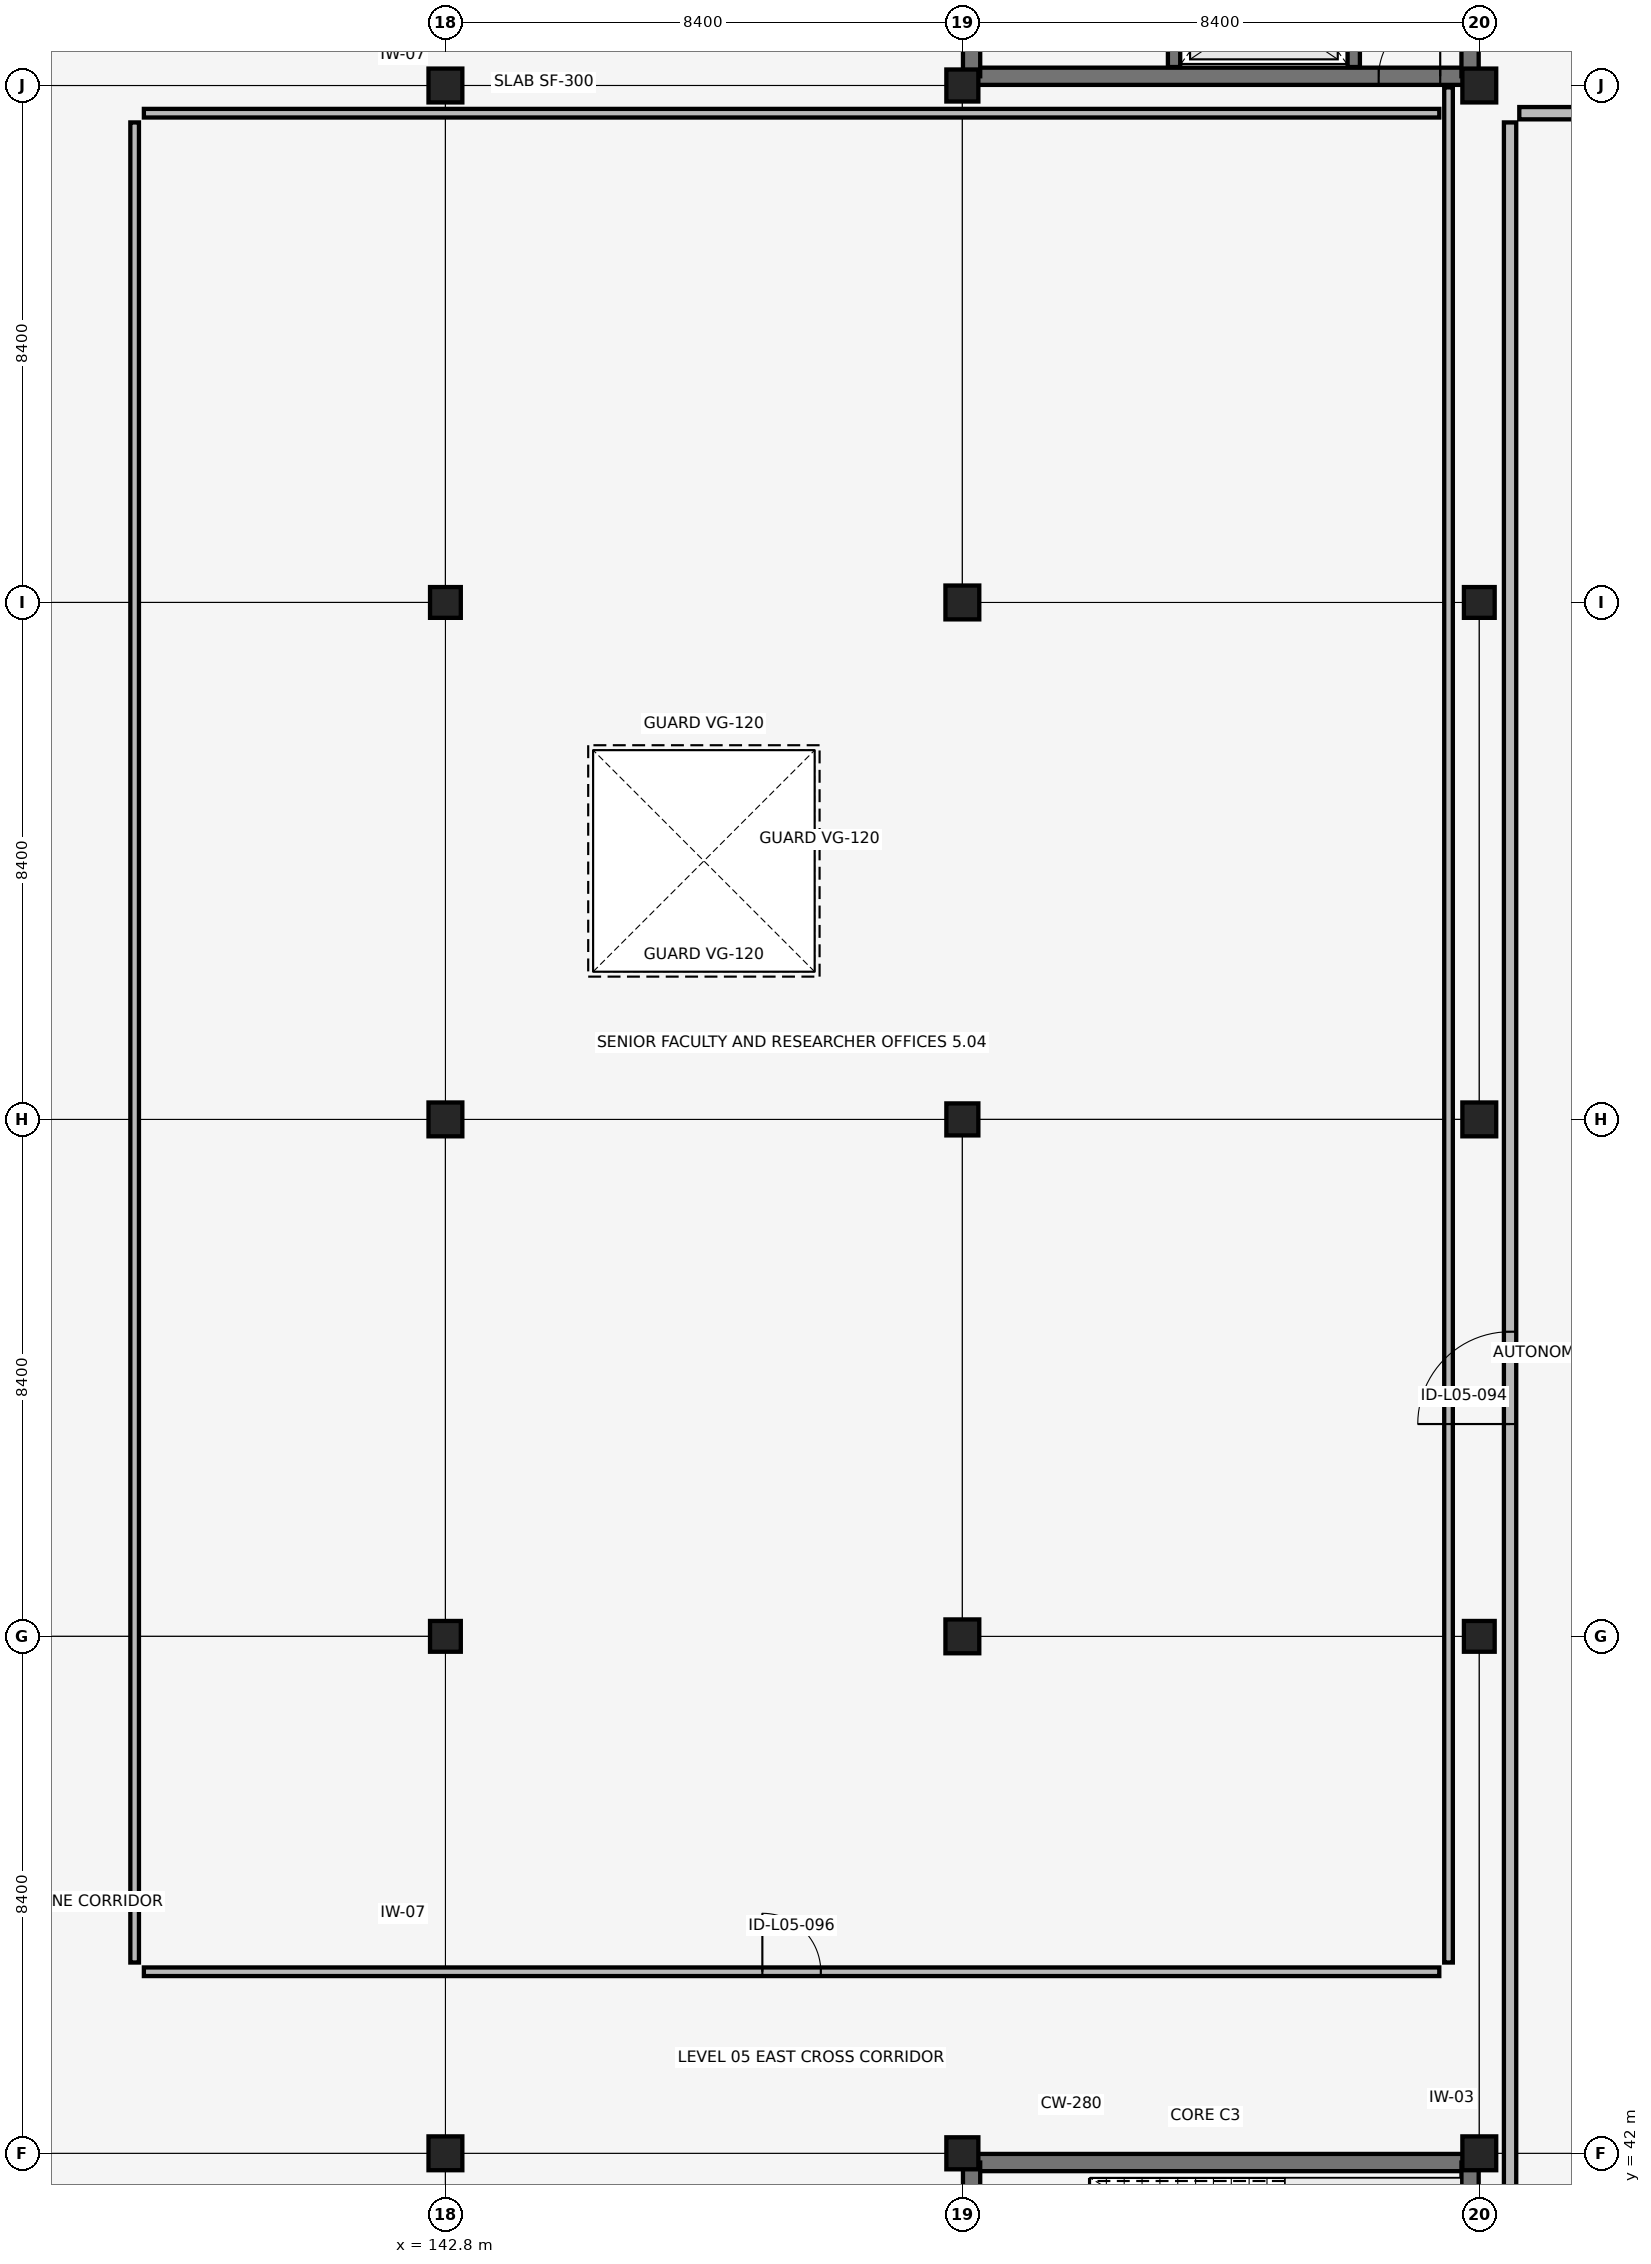
"""IFC4 building model, lengths in metres.
Left out: names, types, materials, properties, quantities, classifications, styles, units other than length and angle.
Written with IfcOpenShell. Run it as: python <this file> out.ifc"""

import sys

from ifc_helpers import new_model, si_unit, direction, frame, frame_2d, origin, origin_2d, place, context, subcontext, project, spatial, rectangle, extrude, element, fill, save


model = new_model("IFC4")
c1 = context("Model", 3, precision=1e-05, world=origin(), true_north=direction((0.0, 1.0)))
c2 = subcontext(c1, "Body", "Model", "MODEL_VIEW")
j1 = project(units=[si_unit("LENGTHUNIT", "METRE"), si_unit("PLANEANGLEUNIT", "RADIAN")], contexts=[c1])
p1 = place(None, origin())
s1 = spatial("IfcSite", under=j1, at=p1, CompositionType="ELEMENT")
p2 = place(p1, origin())
s2 = spatial("IfcBuilding", under=s1, at=p2, CompositionType="ELEMENT")
p3 = place(p2, frame((0.0, 0.0, 22.1)))
s3 = spatial("IfcBuildingStorey", under=s2, at=p3, CompositionType="ELEMENT", Elevation=22.1)
p4 = place(p3, frame((151.35, 41.85, 0.0), z_axis=(0.0, 0.0, 1.0), x_axis=(1.0, 0.0, 0.0)))
e1 = element("IfcWall", 1, at=p4, inside=s3, PredefinedType="SHEAR", context=c2, shape_type="SweptSolid", body=[
    extrude(rectangle(XDim=8.1, YDim=0.28, at=frame_2d((4.05, 0.0))), origin(), (0.0, 0.0, 1.0), 3.78),
])
p5 = place(p3, frame((151.35, 33.75, 0.0), z_axis=(0.0, 0.0, 1.0), x_axis=(0.0, 1.0, 0.0)))
e2 = element("IfcWall", 2, at=p5, inside=s3, PredefinedType="SHEAR", context=c2, shape_type="SweptSolid", body=[
    extrude(rectangle(XDim=8.1, YDim=0.28, at=frame_2d((4.05, 0.0))), origin(), (0.0, 0.0, 1.0), 3.78),
])
p6 = place(p5, frame((1.325, 0.0, 0.0)))
e3 = element("IfcOpeningElement", 3, at=p6, cuts=e2, PredefinedType="OPENING", context=c2, shape_type="SweptSolid", body=[
    extrude(rectangle(XDim=1.45, YDim=2.15, at=frame_2d((0.725, 1.075))), frame((0.0, 0.15, 0.0), z_axis=(0.0, -1.0, 0.0), x_axis=(1.0, 0.0, 0.0)), (0.0, 0.0, 1.0), 0.3),
])
p7 = place(p3, frame((159.45, 33.75, 0.0), z_axis=(0.0, 0.0, 1.0), x_axis=(0.0, 1.0, 0.0)))
e4 = element("IfcWall", 4, at=p7, inside=s3, PredefinedType="SHEAR", context=c2, shape_type="SweptSolid", body=[
    extrude(rectangle(XDim=8.1, YDim=0.28, at=frame_2d((4.05, 0.0))), origin(), (0.0, 0.0, 1.0), 3.78),
])
p8 = place(p3, frame((151.35, 75.75, 0.0), z_axis=(0.0, 0.0, 1.0), x_axis=(1.0, 0.0, 0.0)))
e5 = element("IfcWall", 5, at=p8, inside=s3, PredefinedType="SHEAR", context=c2, shape_type="SweptSolid", body=[
    extrude(rectangle(XDim=8.1, YDim=0.28, at=frame_2d((4.05, 0.0))), origin(), (0.0, 0.0, 1.0), 3.78),
])
p9 = place(p8, frame((6.615, 0.0, 0.0)))
e6 = element("IfcOpeningElement", 6, at=p9, cuts=e5, PredefinedType="OPENING", context=c2, shape_type="SweptSolid", body=[
    extrude(rectangle(XDim=1.0, YDim=2.15, at=frame_2d((0.5, 1.075))), frame((0.0, 0.15, 0.0), z_axis=(0.0, -1.0, 0.0), x_axis=(1.0, 0.0, 0.0)), (0.0, 0.0, 1.0), 0.3),
])
p10 = place(p3, frame((151.35, 75.75, 0.0), z_axis=(0.0, 0.0, 1.0), x_axis=(0.0, 1.0, 0.0)))
e7 = element("IfcWall", 7, at=p10, inside=s3, PredefinedType="SHEAR", context=c2, shape_type="SweptSolid", body=[
    extrude(rectangle(XDim=8.1, YDim=0.28, at=frame_2d((4.05, 0.0))), origin(), (0.0, 0.0, 1.0), 3.78),
])
p11 = place(p10, frame((1.325, 0.0, 0.0)))
e8 = element("IfcOpeningElement", 8, at=p11, cuts=e7, PredefinedType="OPENING", context=c2, shape_type="SweptSolid", body=[
    extrude(rectangle(XDim=1.45, YDim=2.15, at=frame_2d((0.725, 1.075))), frame((0.0, 0.15, 0.0), z_axis=(0.0, -1.0, 0.0), x_axis=(1.0, 0.0, 0.0)), (0.0, 0.0, 1.0), 0.3),
])
p12 = place(p3, frame((159.45, 75.75, 0.0), z_axis=(0.0, 0.0, 1.0), x_axis=(0.0, 1.0, 0.0)))
e9 = element("IfcWall", 9, at=p12, inside=s3, PredefinedType="SHEAR", context=c2, shape_type="SweptSolid", body=[
    extrude(rectangle(XDim=8.1, YDim=0.28, at=frame_2d((4.05, 0.0))), origin(), (0.0, 0.0, 1.0), 3.78),
])
p13 = place(p3, frame((142.8, 42.0, 0.0), z_axis=(0.0, 0.0, 1.0), x_axis=(1.0, 0.0, 0.0)))
e10 = element("IfcColumn", 10, at=p13, inside=s3, PredefinedType="COLUMN", context=c2, shape_type="SweptSolid", body=[
    extrude(rectangle(XDim=0.55, YDim=0.55, at=origin_2d()), origin(), (0.0, 0.0, 1.0), 3.78),
])
p14 = place(p3, frame((142.8, 50.4, 0.0), z_axis=(0.0, 0.0, 1.0), x_axis=(1.0, 0.0, 0.0)))
e11 = element("IfcColumn", 11, at=p14, inside=s3, PredefinedType="COLUMN", context=c2, shape_type="SweptSolid", body=[
    extrude(rectangle(XDim=0.5, YDim=0.5, at=origin_2d()), origin(), (0.0, 0.0, 1.0), 3.78),
])
p15 = place(p3, frame((142.8, 58.8, 0.0), z_axis=(0.0, 0.0, 1.0), x_axis=(1.0, 0.0, 0.0)))
e12 = element("IfcColumn", 12, at=p15, inside=s3, PredefinedType="COLUMN", context=c2, shape_type="SweptSolid", body=[
    extrude(rectangle(XDim=0.55, YDim=0.55, at=origin_2d()), origin(), (0.0, 0.0, 1.0), 3.78),
])
p16 = place(p3, frame((142.8, 67.2, 0.0), z_axis=(0.0, 0.0, 1.0), x_axis=(1.0, 0.0, 0.0)))
e13 = element("IfcColumn", 13, at=p16, inside=s3, PredefinedType="COLUMN", context=c2, shape_type="SweptSolid", body=[
    extrude(rectangle(XDim=0.5, YDim=0.5, at=origin_2d()), origin(), (0.0, 0.0, 1.0), 3.78),
])
p17 = place(p3, frame((142.8, 75.6, 0.0), z_axis=(0.0, 0.0, 1.0), x_axis=(1.0, 0.0, 0.0)))
e14 = element("IfcColumn", 14, at=p17, inside=s3, PredefinedType="COLUMN", context=c2, shape_type="SweptSolid", body=[
    extrude(rectangle(XDim=0.55, YDim=0.55, at=origin_2d()), origin(), (0.0, 0.0, 1.0), 3.78),
])
p18 = place(p3, frame((151.2, 42.0, 0.0), z_axis=(0.0, 0.0, 1.0), x_axis=(1.0, 0.0, 0.0)))
e15 = element("IfcColumn", 15, at=p18, inside=s3, PredefinedType="COLUMN", context=c2, shape_type="SweptSolid", body=[
    extrude(rectangle(XDim=0.52, YDim=0.52, at=origin_2d()), origin(), (0.0, 0.0, 1.0), 3.78),
])
p19 = place(p3, frame((151.2, 50.4, 0.0), z_axis=(0.0, 0.0, 1.0), x_axis=(1.0, 0.0, 0.0)))
e16 = element("IfcColumn", 16, at=p19, inside=s3, PredefinedType="COLUMN", context=c2, shape_type="SweptSolid", body=[
    extrude(rectangle(XDim=0.55, YDim=0.55, at=origin_2d()), origin(), (0.0, 0.0, 1.0), 3.78),
])
p20 = place(p3, frame((151.2, 58.8, 0.0), z_axis=(0.0, 0.0, 1.0), x_axis=(1.0, 0.0, 0.0)))
e17 = element("IfcColumn", 17, at=p20, inside=s3, PredefinedType="COLUMN", context=c2, shape_type="SweptSolid", body=[
    extrude(rectangle(XDim=0.52, YDim=0.52, at=origin_2d()), origin(), (0.0, 0.0, 1.0), 3.78),
])
p21 = place(p3, frame((151.2, 67.2, 0.0), z_axis=(0.0, 0.0, 1.0), x_axis=(1.0, 0.0, 0.0)))
e18 = element("IfcColumn", 18, at=p21, inside=s3, PredefinedType="COLUMN", context=c2, shape_type="SweptSolid", body=[
    extrude(rectangle(XDim=0.55, YDim=0.55, at=origin_2d()), origin(), (0.0, 0.0, 1.0), 3.78),
])
p22 = place(p3, frame((151.2, 75.6, 0.0), z_axis=(0.0, 0.0, 1.0), x_axis=(1.0, 0.0, 0.0)))
e19 = element("IfcColumn", 19, at=p22, inside=s3, PredefinedType="COLUMN", context=c2, shape_type="SweptSolid", body=[
    extrude(rectangle(XDim=0.52, YDim=0.52, at=origin_2d()), origin(), (0.0, 0.0, 1.0), 3.78),
])
p23 = place(p3, frame((159.6, 42.0, 0.0), z_axis=(0.0, 0.0, 1.0), x_axis=(1.0, 0.0, 0.0)))
e20 = element("IfcColumn", 20, at=p23, inside=s3, PredefinedType="COLUMN", context=c2, shape_type="SweptSolid", body=[
    extrude(rectangle(XDim=0.55, YDim=0.55, at=origin_2d()), origin(), (0.0, 0.0, 1.0), 3.78),
])
p24 = place(p3, frame((159.6, 50.4, 0.0), z_axis=(0.0, 0.0, 1.0), x_axis=(1.0, 0.0, 0.0)))
e21 = element("IfcColumn", 21, at=p24, inside=s3, PredefinedType="COLUMN", context=c2, shape_type="SweptSolid", body=[
    extrude(rectangle(XDim=0.5, YDim=0.5, at=origin_2d()), origin(), (0.0, 0.0, 1.0), 3.78),
])
p25 = place(p3, frame((159.6, 58.8, 0.0), z_axis=(0.0, 0.0, 1.0), x_axis=(1.0, 0.0, 0.0)))
e22 = element("IfcColumn", 22, at=p25, inside=s3, PredefinedType="COLUMN", context=c2, shape_type="SweptSolid", body=[
    extrude(rectangle(XDim=0.55, YDim=0.55, at=origin_2d()), origin(), (0.0, 0.0, 1.0), 3.78),
])
p26 = place(p3, frame((159.6, 67.2, 0.0), z_axis=(0.0, 0.0, 1.0), x_axis=(1.0, 0.0, 0.0)))
e23 = element("IfcColumn", 23, at=p26, inside=s3, PredefinedType="COLUMN", context=c2, shape_type="SweptSolid", body=[
    extrude(rectangle(XDim=0.5, YDim=0.5, at=origin_2d()), origin(), (0.0, 0.0, 1.0), 3.78),
])
p27 = place(p3, frame((159.6, 75.6, 0.0), z_axis=(0.0, 0.0, 1.0), x_axis=(1.0, 0.0, 0.0)))
e24 = element("IfcColumn", 24, at=p27, inside=s3, PredefinedType="COLUMN", context=c2, shape_type="SweptSolid", body=[
    extrude(rectangle(XDim=0.55, YDim=0.55, at=origin_2d()), origin(), (0.0, 0.0, 1.0), 3.78),
])
p28 = place(p3, frame((154.64, 75.9, 0.0), z_axis=(0.0, 0.0, 1.0), x_axis=(0.0, 1.0, 0.0)))
e25 = element("IfcWall", 25, at=p28, inside=s3, PredefinedType="SHEAR", context=c2, shape_type="SweptSolid", body=[
    extrude(rectangle(XDim=3.8, YDim=0.2, at=frame_2d((1.9, 0.0))), origin(), (0.0, 0.0, 1.0), 3.78),
])
p29 = place(p28, frame((0.375, 0.0, 0.0)))
e26 = element("IfcOpeningElement", 26, at=p29, cuts=e25, PredefinedType="OPENING", context=c2, shape_type="SweptSolid", body=[
    extrude(rectangle(XDim=1.1, YDim=2.15, at=frame_2d((0.55, 1.075))), frame((0.0, 0.11, 0.0), z_axis=(0.0, -1.0, 0.0), x_axis=(1.0, 0.0, 0.0)), (0.0, 0.0, 1.0), 0.22),
])
p30 = place(p28, frame((2.325, 0.0, 0.0)))
e27 = element("IfcOpeningElement", 27, at=p30, cuts=e25, PredefinedType="OPENING", context=c2, shape_type="SweptSolid", body=[
    extrude(rectangle(XDim=1.1, YDim=2.15, at=frame_2d((0.55, 1.075))), frame((0.0, 0.11, 0.0), z_axis=(0.0, -1.0, 0.0), x_axis=(1.0, 0.0, 0.0)), (0.0, 0.0, 1.0), 0.22),
])
p31 = place(p3, frame((157.56, 75.9, 0.0), z_axis=(0.0, 0.0, 1.0), x_axis=(0.0, 1.0, 0.0)))
e28 = element("IfcWall", 28, at=p31, inside=s3, PredefinedType="SHEAR", context=c2, shape_type="SweptSolid", body=[
    extrude(rectangle(XDim=3.8, YDim=0.2, at=frame_2d((1.9, 0.0))), origin(), (0.0, 0.0, 1.0), 3.78),
])
p32 = place(p3, frame((160.1, 34.2, 0.0), z_axis=(0.0, 0.0, 1.0), x_axis=(0.0, 1.0, 0.0)))
e29 = element("IfcWall", 29, at=p32, inside=s3, PredefinedType="PARTITIONING", context=c2, shape_type="SweptSolid", body=[
    extrude(rectangle(XDim=40.8, YDim=0.2, at=frame_2d((20.4, 0.0))), origin(), (0.0, 0.0, 1.0), 3.78),
])
p33 = place(p32, frame((19.65, 0.0, 0.0)))
e30 = element("IfcOpeningElement", 30, at=p33, cuts=e29, PredefinedType="OPENING", context=c2, shape_type="SweptSolid", body=[
    extrude(rectangle(XDim=1.5, YDim=2.2, at=frame_2d((0.75, 1.1))), frame((0.0, 0.11, 0.0), z_axis=(0.0, -1.0, 0.0), x_axis=(1.0, 0.0, 0.0)), (0.0, 0.0, 1.0), 0.22),
])
p34 = place(p3, frame((160.25, 75.15, 0.0), z_axis=(0.0, 0.0, 1.0), x_axis=(1.0, 0.0, 0.0)))
e31 = element("IfcWall", 31, at=p34, inside=s3, PredefinedType="PARTITIONING", context=c2, shape_type="SweptSolid", body=[
    extrude(rectangle(XDim=7.57, YDim=0.2, at=frame_2d((3.785, 0.0))), origin(), (0.0, 0.0, 1.0), 3.78),
])
p35 = place(p3, frame((137.9, 44.95, 0.0), z_axis=(0.0, 0.0, 1.0), x_axis=(1.0, 0.0, 0.0)))
e32 = element("IfcWall", 32, at=p35, inside=s3, PredefinedType="PARTITIONING", context=c2, shape_type="SweptSolid", body=[
    extrude(rectangle(XDim=21.05, YDim=0.14, at=frame_2d((10.525, 0.0))), origin(), (0.0, 0.0, 1.0), 3.13),
])
p36 = place(p35, frame((10.05, 0.0, 0.0)))
e33 = element("IfcOpeningElement", 33, at=p36, cuts=e32, PredefinedType="OPENING", context=c2, shape_type="SweptSolid", body=[
    extrude(rectangle(XDim=0.95, YDim=2.1, at=frame_2d((0.475, 1.05))), frame((0.0, 0.08, 0.0), z_axis=(0.0, -1.0, 0.0), x_axis=(1.0, 0.0, 0.0)), (0.0, 0.0, 1.0), 0.16),
])
p37 = place(p3, frame((137.9, 75.15, 0.0), z_axis=(0.0, 0.0, 1.0), x_axis=(1.0, 0.0, 0.0)))
e34 = element("IfcWall", 34, at=p37, inside=s3, PredefinedType="PARTITIONING", context=c2, shape_type="SweptSolid", body=[
    extrude(rectangle(XDim=21.05, YDim=0.14, at=frame_2d((10.525, 0.0))), origin(), (0.0, 0.0, 1.0), 3.13),
])
p38 = place(p3, frame((137.75, 45.1, 0.0), z_axis=(0.0, 0.0, 1.0), x_axis=(0.0, 1.0, 0.0)))
e35 = element("IfcWall", 35, at=p38, inside=s3, PredefinedType="PARTITIONING", context=c2, shape_type="SweptSolid", body=[
    extrude(rectangle(XDim=29.9, YDim=0.14, at=frame_2d((14.95, 0.0))), origin(), (0.0, 0.0, 1.0), 3.08),
])
p39 = place(p3, frame((159.1, 45.1, 0.0), z_axis=(0.0, 0.0, 1.0), x_axis=(0.0, 1.0, 0.0)))
e36 = element("IfcWall", 36, at=p39, inside=s3, PredefinedType="PARTITIONING", context=c2, shape_type="SweptSolid", body=[
    extrude(rectangle(XDim=30.47, YDim=0.14, at=frame_2d((15.235, 0.0))), origin(), (0.0, 0.0, 1.0), 3.08),
])
p40 = place(p9, origin())
e37 = element("IfcDoor", 37, at=p40, inside=s3, OperationType="SINGLE_SWING_RIGHT", PredefinedType="DOOR", context=c2, shape_type="SweptSolid", body=[
    extrude(rectangle(XDim=1.0, YDim=2.15, at=frame_2d((0.5, 1.075))), frame((0.0, 0.025, 0.0), z_axis=(0.0, -1.0, 0.0), x_axis=(1.0, 0.0, 0.0)), (0.0, 0.0, 1.0), 0.05),
])
fill(e6, e37)
p41 = place(p33, origin())
e38 = element("IfcDoor", 38, at=p41, inside=s3, OperationType="DOUBLE_DOOR_SINGLE_SWING", PredefinedType="DOOR", context=c2, shape_type="SweptSolid", body=[
    extrude(rectangle(XDim=1.5, YDim=2.2, at=frame_2d((0.75, 1.1))), frame((0.0, 0.025, 0.0), z_axis=(0.0, -1.0, 0.0), x_axis=(1.0, 0.0, 0.0)), (0.0, 0.0, 1.0), 0.05),
])
fill(e30, e38)
p42 = place(p36, origin())
e39 = element("IfcDoor", 39, at=p42, inside=s3, OperationType="SINGLE_SWING_LEFT", PredefinedType="DOOR", context=c2, shape_type="SweptSolid", body=[
    extrude(rectangle(XDim=0.95, YDim=2.1, at=frame_2d((0.475, 1.05))), frame((0.0, 0.025, 0.0), z_axis=(0.0, -1.0, 0.0), x_axis=(1.0, 0.0, 0.0)), (0.0, 0.0, 1.0), 0.05),
])
fill(e33, e39)
save(model, sys.argv[1])
